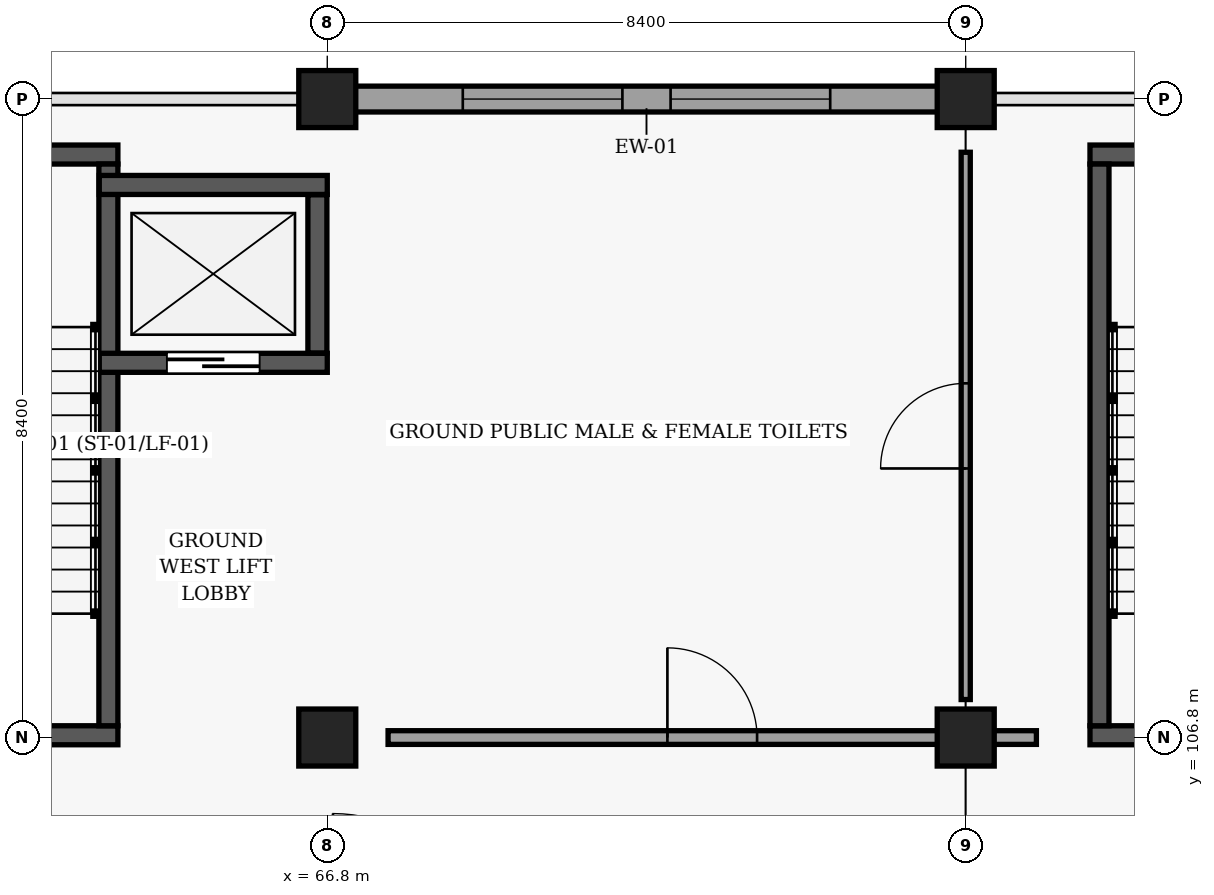
"""IFC4 building model, lengths in metres.
Left out: names, types, materials, properties, quantities, classifications, styles, units other than length and angle.
Written with IfcOpenShell. Run it as: python <this file> out.ifc"""

import sys

from ifc_helpers import new_model, si_unit, direction, frame, frame_2d, origin, origin_2d, place, context, subcontext, project, spatial, rectangle, extrude, element, fill, save


model = new_model("IFC4")
c1 = context("Model", 3, precision=1e-05, world=origin(), true_north=direction((0.0, 1.0)))
c2 = subcontext(c1, "Body", "Model", "MODEL_VIEW")
j1 = project(units=[si_unit("LENGTHUNIT", "METRE"), si_unit("PLANEANGLEUNIT", "RADIAN")], contexts=[c1])
p1 = place(None, origin())
s1 = spatial("IfcSite", under=j1, at=p1, CompositionType="ELEMENT")
p2 = place(p1, origin())
s2 = spatial("IfcBuilding", under=s1, at=p2, CompositionType="ELEMENT")
p3 = place(p2, origin())
s3 = spatial("IfcBuildingStorey", under=s2, at=p3, CompositionType="ELEMENT", Elevation=0.0)
for number, where, z_axis, x_axis in (
    (1, (66.8, 106.8, 0.0), (0.0, 0.0, 1.0), (1.0, 0.0, 0.0)),
    (2, (66.8, 115.2, 0.0), (0.0, 0.0, 1.0), (1.0, 0.0, 0.0)),
    (3, (75.2, 106.8, 0.0), (0.0, 0.0, 1.0), (1.0, 0.0, 0.0)),
    (4, (75.2, 115.2, 0.0), (0.0, 0.0, 1.0), (1.0, 0.0, 0.0)),
):
    element("IfcColumn", number, at=place(p3, frame(where, z_axis=z_axis, x_axis=x_axis)), inside=s3, PredefinedType="COLUMN", context=c2, shape_type="SweptSolid", body=[
        extrude(rectangle(XDim=0.75, YDim=0.75, at=origin_2d()), origin(), (0.0, 0.0, 1.0), 4.8),
    ])
p4 = place(p3, frame((66.9, 115.2, 0.0), z_axis=(0.0, 0.0, 1.0), x_axis=(1.0, 0.0, 0.0)))
e5 = element("IfcWall", 5, at=p4, inside=s3, PredefinedType="SOLIDWALL", context=c2, shape_type="SweptSolid", body=[
    extrude(rectangle(XDim=8.2, YDim=0.34, at=frame_2d((4.1, 0.0))), origin(), (0.0, 0.0, 1.0), 3.675),
])
p5 = place(p4, frame((1.683, 0.0, 0.95)))
e6 = element("IfcOpeningElement", 6, at=p5, cuts=e5, PredefinedType="OPENING", context=c2, shape_type="SweptSolid", body=[
    extrude(rectangle(XDim=2.1, YDim=1.8, at=frame_2d((1.05, 0.9))), frame((0.0, 0.18, 0.0), z_axis=(0.0, -1.0, 0.0), x_axis=(1.0, 0.0, 0.0)), (0.0, 0.0, 1.0), 0.36),
])
p6 = place(p4, frame((4.417, 0.0, 0.95)))
e7 = element("IfcOpeningElement", 7, at=p6, cuts=e5, PredefinedType="OPENING", context=c2, shape_type="SweptSolid", body=[
    extrude(rectangle(XDim=2.1, YDim=1.8, at=frame_2d((1.05, 0.9))), frame((0.0, 0.18, 0.0), z_axis=(0.0, -1.0, 0.0), x_axis=(1.0, 0.0, 0.0)), (0.0, 0.0, 1.0), 0.36),
])
p7 = place(p3, frame((64.045, 106.83, 0.0), z_axis=(0.0, 0.0, 1.0), x_axis=(-1.0, 0.0, 0.0)))
e8 = element("IfcWall", 8, at=p7, inside=s3, PredefinedType="SHEAR", context=c2, shape_type="SweptSolid", body=[
    extrude(rectangle(XDim=3.61, YDim=0.25, at=frame_2d((1.805, 0.0))), origin(), (0.0, 0.0, 1.0), 4.56),
])
p8 = place(p7, frame((1.205, 0.0, 0.0)))
e9 = element("IfcOpeningElement", 9, at=p8, cuts=e8, PredefinedType="OPENING", context=c2, shape_type="SweptSolid", body=[
    extrude(rectangle(XDim=1.2, YDim=2.15, at=frame_2d((0.6, 1.075))), frame((0.0, 0.135, 0.0), z_axis=(0.0, -1.0, 0.0), x_axis=(1.0, 0.0, 0.0)), (0.0, 0.0, 1.0), 0.27),
])
p9 = place(p3, frame((60.435, 114.47, 0.0), z_axis=(0.0, 0.0, 1.0), x_axis=(1.0, 0.0, 0.0)))
e10 = element("IfcWall", 10, at=p9, inside=s3, PredefinedType="SHEAR", context=c2, shape_type="SweptSolid", body=[
    extrude(rectangle(XDim=3.61, YDim=0.25, at=frame_2d((1.805, 0.0))), origin(), (0.0, 0.0, 1.0), 4.56),
])
p10 = place(p3, frame((63.92, 114.345, 0.0), z_axis=(0.0, 0.0, 1.0), x_axis=(0.0, -1.0, 0.0)))
e11 = element("IfcWall", 11, at=p10, inside=s3, PredefinedType="SHEAR", context=c2, shape_type="SweptSolid", body=[
    extrude(rectangle(XDim=7.39, YDim=0.25, at=frame_2d((3.695, 0.0))), origin(), (0.0, 0.0, 1.0), 4.56),
])
p11 = place(p3, frame((63.8, 111.73, 0.0), z_axis=(0.0, 0.0, 1.0), x_axis=(1.0, 0.0, 0.0)))
e12 = element("IfcWall", 12, at=p11, inside=s3, PredefinedType="SHEAR", context=c2, shape_type="SweptSolid", body=[
    extrude(rectangle(XDim=3.0, YDim=0.25, at=frame_2d((1.5, 0.0))), origin(), (0.0, 0.0, 1.0), 4.56),
])
p12 = place(p11, frame((0.89, 0.0, 0.0)))
e13 = element("IfcOpeningElement", 13, at=p12, cuts=e12, PredefinedType="OPENING", context=c2, shape_type="SweptSolid", body=[
    extrude(rectangle(XDim=1.22, YDim=2.18, at=frame_2d((0.61, 1.09))), frame((0.0, 0.135, 0.0), z_axis=(0.0, -1.0, 0.0), x_axis=(1.0, 0.0, 0.0)), (0.0, 0.0, 1.0), 0.27),
])
p13 = place(p3, frame((66.8, 114.07, 0.0), z_axis=(0.0, 0.0, 1.0), x_axis=(-1.0, 0.0, 0.0)))
e14 = element("IfcWall", 14, at=p13, inside=s3, PredefinedType="SHEAR", context=c2, shape_type="SweptSolid", body=[
    extrude(rectangle(XDim=3.0, YDim=0.25, at=frame_2d((1.5, 0.0))), origin(), (0.0, 0.0, 1.0), 4.56),
])
p14 = place(p3, frame((66.67, 111.86, 0.0), z_axis=(0.0, 0.0, 1.0), x_axis=(0.0, 1.0, 0.0)))
e15 = element("IfcWall", 15, at=p14, inside=s3, PredefinedType="SHEAR", context=c2, shape_type="SweptSolid", body=[
    extrude(rectangle(XDim=2.08, YDim=0.25, at=frame_2d((1.04, 0.0))), origin(), (0.0, 0.0, 1.0), 4.56),
])
p15 = place(p3, frame((80.445, 106.83, 0.0), z_axis=(0.0, 0.0, 1.0), x_axis=(-1.0, 0.0, 0.0)))
e16 = element("IfcWall", 16, at=p15, inside=s3, PredefinedType="SHEAR", context=c2, shape_type="SweptSolid", body=[
    extrude(rectangle(XDim=3.61, YDim=0.25, at=frame_2d((1.805, 0.0))), origin(), (0.0, 0.0, 1.0), 4.56),
])
p16 = place(p15, frame((1.235, 0.0, 0.0)))
e17 = element("IfcOpeningElement", 17, at=p16, cuts=e16, PredefinedType="OPENING", context=c2, shape_type="SweptSolid", body=[
    extrude(rectangle(XDim=1.14, YDim=2.15, at=frame_2d((0.57, 1.075))), frame((0.0, 0.135, 0.0), z_axis=(0.0, -1.0, 0.0), x_axis=(1.0, 0.0, 0.0)), (0.0, 0.0, 1.0), 0.27),
])
p17 = place(p3, frame((76.835, 114.47, 0.0), z_axis=(0.0, 0.0, 1.0), x_axis=(1.0, 0.0, 0.0)))
e18 = element("IfcWall", 18, at=p17, inside=s3, PredefinedType="SHEAR", context=c2, shape_type="SweptSolid", body=[
    extrude(rectangle(XDim=3.61, YDim=0.25, at=frame_2d((1.805, 0.0))), origin(), (0.0, 0.0, 1.0), 4.56),
])
p18 = place(p3, frame((76.96, 106.955, 0.0), z_axis=(0.0, 0.0, 1.0), x_axis=(0.0, 1.0, 0.0)))
e19 = element("IfcWall", 19, at=p18, inside=s3, PredefinedType="SHEAR", context=c2, shape_type="SweptSolid", body=[
    extrude(rectangle(XDim=7.39, YDim=0.25, at=frame_2d((3.695, 0.0))), origin(), (0.0, 0.0, 1.0), 4.56),
])
p19 = place(p3, frame((67.6, 106.8, 0.0), z_axis=(0.0, 0.0, 1.0), x_axis=(1.0, 0.0, 0.0)))
e20 = element("IfcWall", 20, at=p19, inside=s3, PredefinedType="PARTITIONING", context=c2, shape_type="SweptSolid", body=[
    extrude(rectangle(XDim=8.53, YDim=0.18, at=frame_2d((4.265, 0.0))), origin(), (0.0, 0.0, 1.0), 3.675),
])
p20 = place(p19, frame((3.675, 0.0, 0.0)))
e21 = element("IfcOpeningElement", 21, at=p20, cuts=e20, PredefinedType="OPENING", context=c2, shape_type="SweptSolid", body=[
    extrude(rectangle(XDim=1.18, YDim=2.18, at=frame_2d((0.59, 1.09))), frame((0.0, 0.1, 0.0), z_axis=(0.0, -1.0, 0.0), x_axis=(1.0, 0.0, 0.0)), (0.0, 0.0, 1.0), 0.2),
])
p21 = place(p3, frame((75.2, 107.3, 0.0), z_axis=(0.0, 0.0, 1.0), x_axis=(0.0, 1.0, 0.0)))
e22 = element("IfcWall", 22, at=p21, inside=s3, PredefinedType="PARTITIONING", context=c2, shape_type="SweptSolid", body=[
    extrude(rectangle(XDim=7.2, YDim=0.12, at=frame_2d((3.6, 0.0))), origin(), (0.0, 0.0, 1.0), 3.775),
])
p22 = place(p21, frame((3.04, 0.0, 0.0)))
e23 = element("IfcOpeningElement", 23, at=p22, cuts=e22, PredefinedType="OPENING", context=c2, shape_type="SweptSolid", body=[
    extrude(rectangle(XDim=1.12, YDim=2.16, at=frame_2d((0.56, 1.08))), frame((0.0, 0.07, 0.0), z_axis=(0.0, -1.0, 0.0), x_axis=(1.0, 0.0, 0.0)), (0.0, 0.0, 1.0), 0.14),
])
p23 = place(p5, origin())
e24 = element("IfcWindow", 24, at=p23, inside=s3, PartitioningType="SINGLE_PANEL", PredefinedType="WINDOW", context=c2, shape_type="SweptSolid", body=[
    extrude(rectangle(XDim=2.1, YDim=1.8, at=frame_2d((1.05, 0.9))), frame((0.0, 0.03, 0.0), z_axis=(0.0, -1.0, 0.0), x_axis=(1.0, 0.0, 0.0)), (0.0, 0.0, 1.0), 0.06),
])
fill(e6, e24)
p24 = place(p6, origin())
e25 = element("IfcWindow", 25, at=p24, inside=s3, PartitioningType="SINGLE_PANEL", PredefinedType="WINDOW", context=c2, shape_type="SweptSolid", body=[
    extrude(rectangle(XDim=2.1, YDim=1.8, at=frame_2d((1.05, 0.9))), frame((0.0, 0.03, 0.0), z_axis=(0.0, -1.0, 0.0), x_axis=(1.0, 0.0, 0.0)), (0.0, 0.0, 1.0), 0.06),
])
fill(e7, e25)
p25 = place(p12, origin())
e26 = element("IfcDoor", 26, at=p25, inside=s3, OperationType="SLIDING_TO_RIGHT", PredefinedType="DOOR", context=c2, shape_type="SweptSolid", body=[
    extrude(rectangle(XDim=1.22, YDim=2.18, at=frame_2d((0.61, 1.09))), frame((0.0, 0.025, 0.0), z_axis=(0.0, -1.0, 0.0), x_axis=(1.0, 0.0, 0.0)), (0.0, 0.0, 1.0), 0.05),
])
fill(e13, e26)
p26 = place(p20, origin())
e27 = element("IfcDoor", 27, at=p26, inside=s3, OperationType="SINGLE_SWING_LEFT", PredefinedType="DOOR", context=c2, shape_type="SweptSolid", body=[
    extrude(rectangle(XDim=1.18, YDim=2.18, at=frame_2d((0.59, 1.09))), frame((0.0, 0.025, 0.0), z_axis=(0.0, -1.0, 0.0), x_axis=(1.0, 0.0, 0.0)), (0.0, 0.0, 1.0), 0.05),
])
fill(e21, e27)
p27 = place(p22, origin())
e28 = element("IfcDoor", 28, at=p27, inside=s3, OperationType="SINGLE_SWING_LEFT", PredefinedType="DOOR", context=c2, shape_type="SweptSolid", body=[
    extrude(rectangle(XDim=1.12, YDim=2.16, at=frame_2d((0.56, 1.08))), frame((0.0, 0.025, 0.0), z_axis=(0.0, -1.0, 0.0), x_axis=(1.0, 0.0, 0.0)), (0.0, 0.0, 1.0), 0.05),
])
fill(e23, e28)
save(model, sys.argv[1])
